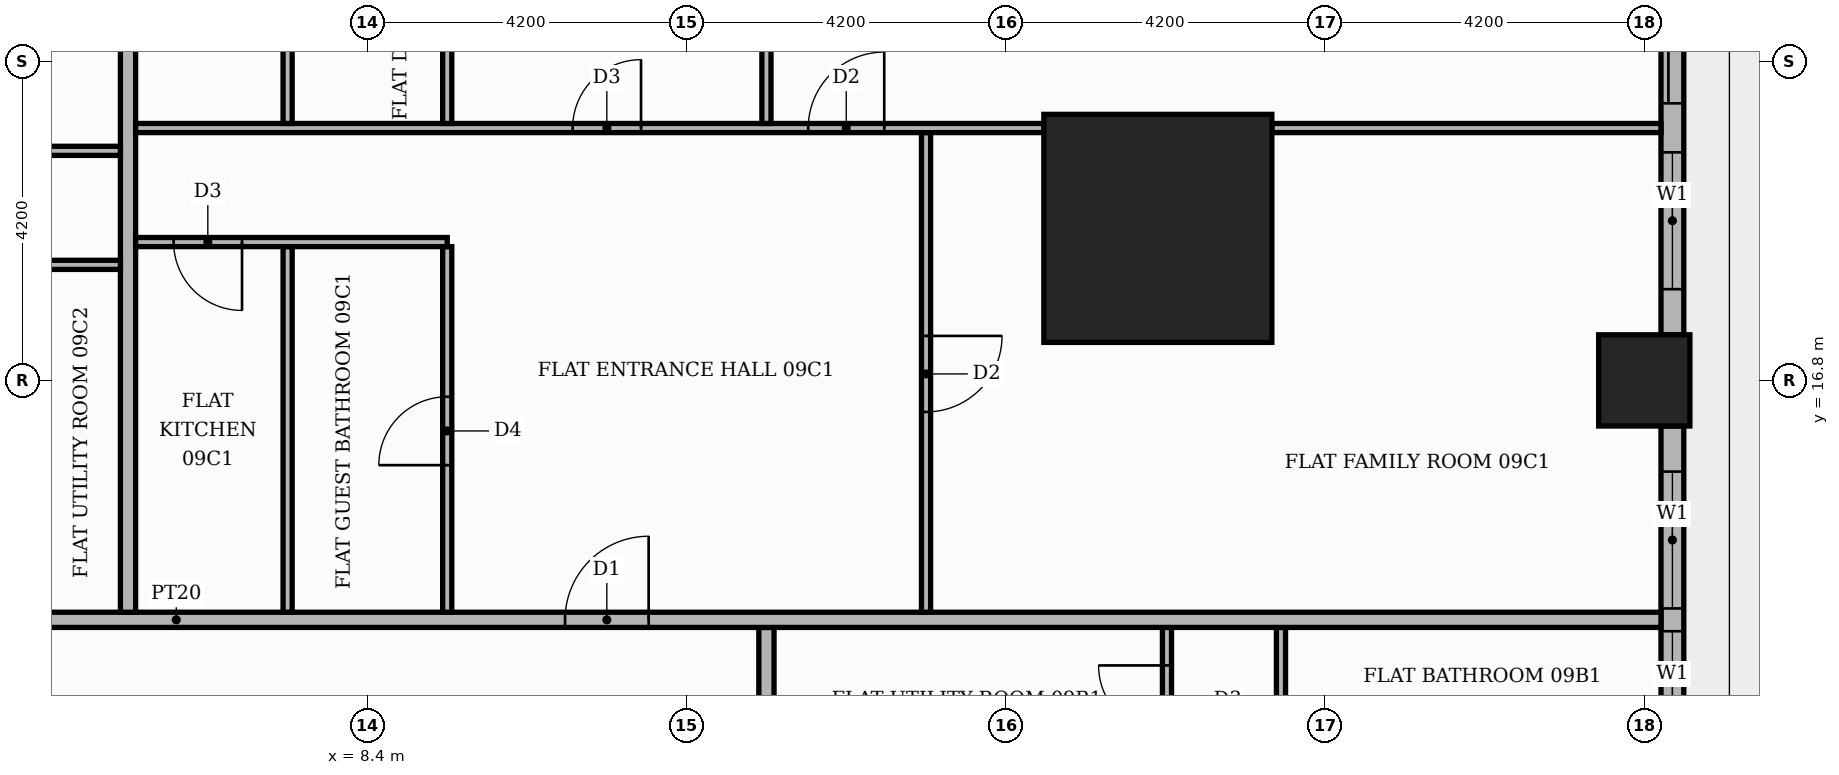
"""IFC4 building model, lengths in metres.
Left out: names, types, materials, properties, quantities, classifications, styles, units other than length and angle.
Written with IfcOpenShell. Run it as: python <this file> out.ifc"""

import sys

from ifc_helpers import new_model, si_unit, direction, frame, frame_2d, origin, origin_2d, place, context, subcontext, project, spatial, rectangle, extrude, element, fill, save


model = new_model("IFC4")
c1 = context("Model", 3, precision=1e-05, world=origin(), true_north=direction((0.0, 1.0)))
c2 = subcontext(c1, "Body", "Model", "MODEL_VIEW")
j1 = project(units=[si_unit("LENGTHUNIT", "METRE"), si_unit("PLANEANGLEUNIT", "RADIAN")], contexts=[c1])
p1 = place(None, origin())
s1 = spatial("IfcSite", under=j1, at=p1, CompositionType="ELEMENT")
p2 = place(p1, origin())
s2 = spatial("IfcBuilding", under=s1, at=p2, CompositionType="ELEMENT")
p3 = place(p2, frame((0.0, 0.0, 42.6)))
s3 = spatial("IfcBuildingStorey", under=s2, at=p3, CompositionType="ELEMENT", Elevation=42.6)
p4 = place(p3, frame((18.8, 18.8, 0.0), z_axis=(0.0, 0.0, 1.0), x_axis=(1.0, 0.0, 0.0)))
e1 = element("IfcColumn", 1, at=p4, inside=s3, PredefinedType="COLUMN", context=c2, shape_type="SweptSolid", body=[
    extrude(rectangle(XDim=3.0, YDim=3.0, at=origin_2d()), origin(), (0.0, 0.0, 1.0), 3.9),
])
p5 = place(p3, frame((25.2, 16.8, 0.0), z_axis=(0.0, 0.0, 1.0), x_axis=(1.0, 0.0, 0.0)))
e2 = element("IfcColumn", 2, at=p5, inside=s3, PredefinedType="COLUMN", context=c2, shape_type="SweptSolid", body=[
    extrude(rectangle(XDim=1.2, YDim=1.2, at=origin_2d()), origin(), (0.0, 0.0, 1.0), 3.9),
])
p6 = place(p3, frame((25.57, 9.0, 0.0), z_axis=(0.0, 0.0, 1.0), x_axis=(0.0, 1.0, 0.0)))
e3 = element("IfcWall", 3, at=p6, inside=s3, PredefinedType="STANDARD", context=c2, shape_type="SweptSolid", body=[
    extrude(rectangle(XDim=7.2, YDim=0.3, at=frame_2d((3.6, 0.0))), origin(), (0.0, 0.0, 1.0), 3.48),
])
p7 = place(p6, frame((0.6, 0.0, 0.9)))
e4 = element("IfcOpeningElement", 4, at=p7, cuts=e3, PredefinedType="OPENING", context=c2, shape_type="SweptSolid", body=[
    extrude(rectangle(XDim=1.8, YDim=2.1, at=frame_2d((0.9, 1.05))), frame((0.0, 0.16, 0.0), z_axis=(0.0, -1.0, 0.0), x_axis=(1.0, 0.0, 0.0)), (0.0, 0.0, 1.0), 0.32),
])
p8 = place(p6, frame((2.7, 0.0, 0.9)))
e5 = element("IfcOpeningElement", 5, at=p8, cuts=e3, PredefinedType="OPENING", context=c2, shape_type="SweptSolid", body=[
    extrude(rectangle(XDim=1.8, YDim=2.1, at=frame_2d((0.9, 1.05))), frame((0.0, 0.16, 0.0), z_axis=(0.0, -1.0, 0.0), x_axis=(1.0, 0.0, 0.0)), (0.0, 0.0, 1.0), 0.32),
])
p9 = place(p6, frame((4.8, 0.0, 0.9)))
e6 = element("IfcOpeningElement", 6, at=p9, cuts=e3, PredefinedType="OPENING", context=c2, shape_type="SweptSolid", body=[
    extrude(rectangle(XDim=1.8, YDim=2.1, at=frame_2d((0.9, 1.05))), frame((0.0, 0.16, 0.0), z_axis=(0.0, -1.0, 0.0), x_axis=(1.0, 0.0, 0.0)), (0.0, 0.0, 1.0), 0.32),
])
p10 = place(p3, frame((25.57, 17.4, 0.0), z_axis=(0.0, 0.0, 1.0), x_axis=(0.0, 1.0, 0.0)))
e7 = element("IfcWall", 7, at=p10, inside=s3, PredefinedType="STANDARD", context=c2, shape_type="SweptSolid", body=[
    extrude(rectangle(XDim=5.32, YDim=0.3, at=frame_2d((2.66, 0.0))), origin(), (0.0, 0.0, 1.0), 3.48),
])
p11 = place(p10, frame((0.6, 0.0, 0.9)))
e8 = element("IfcOpeningElement", 8, at=p11, cuts=e7, PredefinedType="OPENING", context=c2, shape_type="SweptSolid", body=[
    extrude(rectangle(XDim=1.8, YDim=2.1, at=frame_2d((0.9, 1.05))), frame((0.0, 0.16, 0.0), z_axis=(0.0, -1.0, 0.0), x_axis=(1.0, 0.0, 0.0)), (0.0, 0.0, 1.0), 0.32),
])
p12 = place(p10, frame((3.045, 0.0, 0.0)))
e9 = element("IfcOpeningElement", 9, at=p12, cuts=e7, PredefinedType="OPENING", context=c2, shape_type="SweptSolid", body=[
    extrude(rectangle(XDim=1.8, YDim=2.4, at=frame_2d((0.9, 1.2))), frame((0.0, 0.16, 0.0), z_axis=(0.0, -1.0, 0.0), x_axis=(1.0, 0.0, 0.0)), (0.0, 0.0, 1.0), 0.32),
])
p13 = place(p3, frame((13.65, -13.55, 0.0), z_axis=(0.0, 0.0, 1.0), x_axis=(0.0, 1.0, 0.0)))
e10 = element("IfcWall", 10, at=p13, inside=s3, PredefinedType="PARTITIONING", context=c2, shape_type="SweptSolid", body=[
    extrude(rectangle(XDim=27.1, YDim=0.2, at=frame_2d((13.55, 0.0))), origin(), (0.0, 0.0, 1.0), 3.48),
])
p14 = place(p13, frame((2.5, 0.0, 0.0)))
e11 = element("IfcOpeningElement", 11, at=p14, cuts=e10, PredefinedType="OPENING", context=c2, shape_type="SweptSolid", body=[
    extrude(rectangle(XDim=1.1, YDim=2.4, at=frame_2d((0.55, 1.2))), frame((0.0, 0.11, 0.0), z_axis=(0.0, -1.0, 0.0), x_axis=(1.0, 0.0, 0.0)), (0.0, 0.0, 1.0), 0.22),
])
p15 = place(p3, frame((18.92, 11.61, 0.0), z_axis=(0.0, 0.0, 1.0), x_axis=(0.0, 1.0, 0.0)))
e12 = element("IfcWall", 12, at=p15, inside=s3, PredefinedType="PARTITIONING", context=c2, shape_type="SweptSolid", body=[
    extrude(rectangle(XDim=1.94, YDim=0.12, at=frame_2d((0.97, 0.0))), origin(), (0.0, 0.0, 1.0), 3.48),
])
p16 = place(p15, frame((0.54, 0.0, 0.0)))
e13 = element("IfcOpeningElement", 13, at=p16, cuts=e12, PredefinedType="OPENING", context=c2, shape_type="SweptSolid", body=[
    extrude(rectangle(XDim=0.9, YDim=2.1, at=frame_2d((0.45, 1.05))), frame((0.0, 0.07, 0.0), z_axis=(0.0, -1.0, 0.0), x_axis=(1.0, 0.0, 0.0)), (0.0, 0.0, 1.0), 0.14),
])
p17 = place(p3, frame((20.42, 11.61, 0.0), z_axis=(0.0, 0.0, 1.0), x_axis=(0.0, 1.0, 0.0)))
e14 = element("IfcWall", 14, at=p17, inside=s3, PredefinedType="PARTITIONING", context=c2, shape_type="SweptSolid", body=[
    extrude(rectangle(XDim=1.94, YDim=0.12, at=frame_2d((0.97, 0.0))), origin(), (0.0, 0.0, 1.0), 3.48),
])
p18 = place(p3, frame((-13.65, 13.65, 0.0), z_axis=(0.0, 0.0, 1.0), x_axis=(1.0, 0.0, 0.0)))
e15 = element("IfcWall", 15, at=p18, inside=s3, PredefinedType="PARTITIONING", context=c2, shape_type="SweptSolid", body=[
    extrude(rectangle(XDim=39.07, YDim=0.2, at=frame_2d((19.535, 0.0))), origin(), (0.0, 0.0, 1.0), 3.48),
])
p19 = place(p18, frame((24.65, 0.0, 0.0)))
e16 = element("IfcOpeningElement", 16, at=p19, cuts=e15, PredefinedType="OPENING", context=c2, shape_type="SweptSolid", body=[
    extrude(rectangle(XDim=1.1, YDim=2.4, at=frame_2d((0.55, 1.2))), frame((0.0, 0.11, 0.0), z_axis=(0.0, -1.0, 0.0), x_axis=(1.0, 0.0, 0.0)), (0.0, 0.0, 1.0), 0.22),
])
p20 = place(p18, frame((14.15, 0.0, 0.0)))
e17 = element("IfcOpeningElement", 17, at=p20, cuts=e15, PredefinedType="OPENING", context=c2, shape_type="SweptSolid", body=[
    extrude(rectangle(XDim=1.1, YDim=2.4, at=frame_2d((0.55, 1.2))), frame((0.0, 0.11, 0.0), z_axis=(0.0, -1.0, 0.0), x_axis=(1.0, 0.0, 0.0)), (0.0, 0.0, 1.0), 0.22),
])
p21 = place(p3, frame((5.25, 13.75, 0.0), z_axis=(0.0, 0.0, 1.0), x_axis=(0.0, 1.0, 0.0)))
e18 = element("IfcWall", 18, at=p21, inside=s3, PredefinedType="PARTITIONING", context=c2, shape_type="SweptSolid", body=[
    extrude(rectangle(XDim=11.67, YDim=0.2, at=frame_2d((5.835, 0.0))), origin(), (0.0, 0.0, 1.0), 3.48),
])
p22 = place(p3, frame((7.35, 13.75, 0.0), z_axis=(0.0, 0.0, 1.0), x_axis=(0.0, 1.0, 0.0)))
e19 = element("IfcWall", 19, at=p22, inside=s3, PredefinedType="PARTITIONING", context=c2, shape_type="SweptSolid", body=[
    extrude(rectangle(XDim=4.81, YDim=0.12, at=frame_2d((2.405, 0.0))), origin(), (0.0, 0.0, 1.0), 3.48),
])
p23 = place(p3, frame((9.45, 13.75, 0.0), z_axis=(0.0, 0.0, 1.0), x_axis=(0.0, 1.0, 0.0)))
e20 = element("IfcWall", 20, at=p23, inside=s3, PredefinedType="PARTITIONING", context=c2, shape_type="SweptSolid", body=[
    extrude(rectangle(XDim=4.81, YDim=0.12, at=frame_2d((2.405, 0.0))), origin(), (0.0, 0.0, 1.0), 3.48),
])
p24 = place(p23, frame((1.935, 0.0, 0.0)))
e21 = element("IfcOpeningElement", 21, at=p24, cuts=e20, PredefinedType="OPENING", context=c2, shape_type="SweptSolid", body=[
    extrude(rectangle(XDim=0.9, YDim=2.1, at=frame_2d((0.45, 1.05))), frame((0.0, 0.07, 0.0), z_axis=(0.0, -1.0, 0.0), x_axis=(1.0, 0.0, 0.0)), (0.0, 0.0, 1.0), 0.14),
])
p25 = place(p3, frame((15.75, 13.75, 0.0), z_axis=(0.0, 0.0, 1.0), x_axis=(0.0, 1.0, 0.0)))
e22 = element("IfcWall", 22, at=p25, inside=s3, PredefinedType="PARTITIONING", context=c2, shape_type="SweptSolid", body=[
    extrude(rectangle(XDim=6.31, YDim=0.12, at=frame_2d((3.155, 0.0))), origin(), (0.0, 0.0, 1.0), 3.48),
])
p26 = place(p25, frame((2.635, 0.0, 0.0)))
e23 = element("IfcOpeningElement", 23, at=p26, cuts=e22, PredefinedType="OPENING", context=c2, shape_type="SweptSolid", body=[
    extrude(rectangle(XDim=1.0, YDim=2.1, at=frame_2d((0.5, 1.05))), frame((0.0, 0.07, 0.0), z_axis=(0.0, -1.0, 0.0), x_axis=(1.0, 0.0, 0.0)), (0.0, 0.0, 1.0), 0.14),
])
p27 = place(p3, frame((3.15, 18.32, 0.0), z_axis=(0.0, 0.0, 1.0), x_axis=(1.0, 0.0, 0.0)))
e24 = element("IfcWall", 24, at=p27, inside=s3, PredefinedType="PARTITIONING", context=c2, shape_type="SweptSolid", body=[
    extrude(rectangle(XDim=2.0, YDim=0.12, at=frame_2d((1.0, 0.0))), origin(), (0.0, 0.0, 1.0), 3.48),
])
p28 = place(p3, frame((5.35, 18.62, 0.0), z_axis=(0.0, 0.0, 1.0), x_axis=(1.0, 0.0, 0.0)))
e25 = element("IfcWall", 25, at=p28, inside=s3, PredefinedType="PARTITIONING", context=c2, shape_type="SweptSolid", body=[
    extrude(rectangle(XDim=4.1, YDim=0.12, at=frame_2d((2.05, 0.0))), origin(), (0.0, 0.0, 1.0), 3.48),
])
p29 = place(p28, frame((0.5, 0.0, 0.0)))
e26 = element("IfcOpeningElement", 26, at=p29, cuts=e25, PredefinedType="OPENING", context=c2, shape_type="SweptSolid", body=[
    extrude(rectangle(XDim=0.9, YDim=2.1, at=frame_2d((0.45, 1.05))), frame((0.0, 0.07, 0.0), z_axis=(0.0, -1.0, 0.0), x_axis=(1.0, 0.0, 0.0)), (0.0, 0.0, 1.0), 0.14),
])
p30 = place(p3, frame((-13.55, 19.82, 0.0), z_axis=(0.0, 0.0, 1.0), x_axis=(1.0, 0.0, 0.0)))
e27 = element("IfcWall", 27, at=p30, inside=s3, PredefinedType="PARTITIONING", context=c2, shape_type="SweptSolid", body=[
    extrude(rectangle(XDim=18.7, YDim=0.12, at=frame_2d((9.35, 0.0))), origin(), (0.0, 0.0, 1.0), 3.48),
])
p31 = place(p30, frame((16.2, 0.0, 0.0)))
e28 = element("IfcOpeningElement", 28, at=p31, cuts=e27, PredefinedType="OPENING", context=c2, shape_type="SweptSolid", body=[
    extrude(rectangle(XDim=1.0, YDim=2.1, at=frame_2d((0.5, 1.05))), frame((0.0, 0.07, 0.0), z_axis=(0.0, -1.0, 0.0), x_axis=(1.0, 0.0, 0.0)), (0.0, 0.0, 1.0), 0.14),
])
p32 = place(p30, frame((12.05, 0.0, 0.0)))
e29 = element("IfcOpeningElement", 29, at=p32, cuts=e27, PredefinedType="OPENING", context=c2, shape_type="SweptSolid", body=[
    extrude(rectangle(XDim=0.9, YDim=2.1, at=frame_2d((0.45, 1.05))), frame((0.0, 0.07, 0.0), z_axis=(0.0, -1.0, 0.0), x_axis=(1.0, 0.0, 0.0)), (0.0, 0.0, 1.0), 0.14),
])
p33 = place(p30, frame((3.65, 0.0, 0.0)))
e30 = element("IfcOpeningElement", 30, at=p33, cuts=e27, PredefinedType="OPENING", context=c2, shape_type="SweptSolid", body=[
    extrude(rectangle(XDim=0.9, YDim=2.1, at=frame_2d((0.45, 1.05))), frame((0.0, 0.07, 0.0), z_axis=(0.0, -1.0, 0.0), x_axis=(1.0, 0.0, 0.0)), (0.0, 0.0, 1.0), 0.14),
])
p34 = place(p3, frame((5.35, 20.12, 0.0), z_axis=(0.0, 0.0, 1.0), x_axis=(1.0, 0.0, 0.0)))
e31 = element("IfcWall", 31, at=p34, inside=s3, PredefinedType="PARTITIONING", context=c2, shape_type="SweptSolid", body=[
    extrude(rectangle(XDim=11.95, YDim=0.12, at=frame_2d((5.975, 0.0))), origin(), (0.0, 0.0, 1.0), 3.48),
])
p35 = place(p34, frame((8.85, 0.0, 0.0)))
e32 = element("IfcOpeningElement", 32, at=p35, cuts=e31, PredefinedType="OPENING", context=c2, shape_type="SweptSolid", body=[
    extrude(rectangle(XDim=1.0, YDim=2.1, at=frame_2d((0.5, 1.05))), frame((0.0, 0.07, 0.0), z_axis=(0.0, -1.0, 0.0), x_axis=(1.0, 0.0, 0.0)), (0.0, 0.0, 1.0), 0.14),
])
p36 = place(p34, frame((5.75, 0.0, 0.0)))
e33 = element("IfcOpeningElement", 33, at=p36, cuts=e31, PredefinedType="OPENING", context=c2, shape_type="SweptSolid", body=[
    extrude(rectangle(XDim=0.9, YDim=2.1, at=frame_2d((0.45, 1.05))), frame((0.0, 0.07, 0.0), z_axis=(0.0, -1.0, 0.0), x_axis=(1.0, 0.0, 0.0)), (0.0, 0.0, 1.0), 0.14),
])
p37 = place(p3, frame((20.3, 20.12, 0.0), z_axis=(0.0, 0.0, 1.0), x_axis=(1.0, 0.0, 0.0)))
e34 = element("IfcWall", 34, at=p37, inside=s3, PredefinedType="PARTITIONING", context=c2, shape_type="SweptSolid", body=[
    extrude(rectangle(XDim=5.12, YDim=0.12, at=frame_2d((2.56, 0.0))), origin(), (0.0, 0.0, 1.0), 3.48),
])
p38 = place(p3, frame((7.35, 20.18, 0.0), z_axis=(0.0, 0.0, 1.0), x_axis=(0.0, 1.0, 0.0)))
e35 = element("IfcWall", 35, at=p38, inside=s3, PredefinedType="PARTITIONING", context=c2, shape_type="SweptSolid", body=[
    extrude(rectangle(XDim=5.24, YDim=0.12, at=frame_2d((2.62, 0.0))), origin(), (0.0, 0.0, 1.0), 3.48),
])
p39 = place(p38, frame((2.29, 0.0, 0.0)))
e36 = element("IfcOpeningElement", 36, at=p39, cuts=e35, PredefinedType="OPENING", context=c2, shape_type="SweptSolid", body=[
    extrude(rectangle(XDim=0.9, YDim=2.1, at=frame_2d((0.45, 1.05))), frame((0.0, 0.07, 0.0), z_axis=(0.0, -1.0, 0.0), x_axis=(1.0, 0.0, 0.0)), (0.0, 0.0, 1.0), 0.14),
])
p40 = place(p3, frame((9.45, 20.18, 0.0), z_axis=(0.0, 0.0, 1.0), x_axis=(0.0, 1.0, 0.0)))
e37 = element("IfcWall", 37, at=p40, inside=s3, PredefinedType="PARTITIONING", context=c2, shape_type="SweptSolid", body=[
    extrude(rectangle(XDim=5.24, YDim=0.12, at=frame_2d((2.62, 0.0))), origin(), (0.0, 0.0, 1.0), 3.48),
])
p41 = place(p40, frame((2.29, 0.0, 0.0)))
e38 = element("IfcOpeningElement", 38, at=p41, cuts=e37, PredefinedType="OPENING", context=c2, shape_type="SweptSolid", body=[
    extrude(rectangle(XDim=0.9, YDim=2.1, at=frame_2d((0.45, 1.05))), frame((0.0, 0.07, 0.0), z_axis=(0.0, -1.0, 0.0), x_axis=(1.0, 0.0, 0.0)), (0.0, 0.0, 1.0), 0.14),
])
p42 = place(p3, frame((13.65, 20.18, 0.0), z_axis=(0.0, 0.0, 1.0), x_axis=(0.0, 1.0, 0.0)))
e39 = element("IfcWall", 39, at=p42, inside=s3, PredefinedType="PARTITIONING", context=c2, shape_type="SweptSolid", body=[
    extrude(rectangle(XDim=5.24, YDim=0.12, at=frame_2d((2.62, 0.0))), origin(), (0.0, 0.0, 1.0), 3.48),
])
p43 = place(p8, origin())
e40 = element("IfcWindow", 40, at=p43, inside=s3, PartitioningType="SINGLE_PANEL", PredefinedType="WINDOW", context=c2, shape_type="SweptSolid", body=[
    extrude(rectangle(XDim=1.8, YDim=2.1, at=frame_2d((0.9, 1.05))), frame((0.0, 0.03, 0.0), z_axis=(0.0, -1.0, 0.0), x_axis=(1.0, 0.0, 0.0)), (0.0, 0.0, 1.0), 0.06),
])
fill(e5, e40)
p44 = place(p9, origin())
e41 = element("IfcWindow", 41, at=p44, inside=s3, PartitioningType="SINGLE_PANEL", PredefinedType="WINDOW", context=c2, shape_type="SweptSolid", body=[
    extrude(rectangle(XDim=1.8, YDim=2.1, at=frame_2d((0.9, 1.05))), frame((0.0, 0.03, 0.0), z_axis=(0.0, -1.0, 0.0), x_axis=(1.0, 0.0, 0.0)), (0.0, 0.0, 1.0), 0.06),
])
fill(e6, e41)
p45 = place(p11, origin())
e42 = element("IfcWindow", 42, at=p45, inside=s3, PartitioningType="SINGLE_PANEL", PredefinedType="WINDOW", context=c2, shape_type="SweptSolid", body=[
    extrude(rectangle(XDim=1.8, YDim=2.1, at=frame_2d((0.9, 1.05))), frame((0.0, 0.03, 0.0), z_axis=(0.0, -1.0, 0.0), x_axis=(1.0, 0.0, 0.0)), (0.0, 0.0, 1.0), 0.06),
])
fill(e8, e42)
p46 = place(p12, origin())
e43 = element("IfcDoor", 43, at=p46, inside=s3, OperationType="SLIDING_TO_RIGHT", PredefinedType="DOOR", context=c2, shape_type="SweptSolid", body=[
    extrude(rectangle(XDim=1.8, YDim=2.4, at=frame_2d((0.9, 1.2))), frame((0.0, 0.025, 0.0), z_axis=(0.0, -1.0, 0.0), x_axis=(1.0, 0.0, 0.0)), (0.0, 0.0, 1.0), 0.05),
])
fill(e9, e43)
p47 = place(p16, origin())
e44 = element("IfcDoor", 44, at=p47, inside=s3, OperationType="SINGLE_SWING_RIGHT", PredefinedType="DOOR", context=c2, shape_type="SweptSolid", body=[
    extrude(rectangle(XDim=0.9, YDim=2.1, at=frame_2d((0.45, 1.05))), frame((0.0, 0.025, 0.0), z_axis=(0.0, -1.0, 0.0), x_axis=(1.0, 0.0, 0.0)), (0.0, 0.0, 1.0), 0.05),
])
fill(e13, e44)
p48 = place(p19, origin())
e45 = element("IfcDoor", 45, at=p48, inside=s3, OperationType="SINGLE_SWING_RIGHT", PredefinedType="DOOR", context=c2, shape_type="SweptSolid", body=[
    extrude(rectangle(XDim=1.1, YDim=2.4, at=frame_2d((0.55, 1.2))), frame((0.0, 0.025, 0.0), z_axis=(0.0, -1.0, 0.0), x_axis=(1.0, 0.0, 0.0)), (0.0, 0.0, 1.0), 0.05),
])
fill(e16, e45)
p49 = place(p26, frame((1.0, 0.0, 0.0), z_axis=(0.0, 0.0, 1.0), x_axis=(-1.0, 0.0, 0.0)))
e46 = element("IfcDoor", 46, at=p49, inside=s3, OperationType="SINGLE_SWING_RIGHT", PredefinedType="DOOR", context=c2, shape_type="SweptSolid", body=[
    extrude(rectangle(XDim=1.0, YDim=2.1, at=frame_2d((0.5, 1.05))), frame((0.0, 0.025, 0.0), z_axis=(0.0, -1.0, 0.0), x_axis=(1.0, 0.0, 0.0)), (0.0, 0.0, 1.0), 0.05),
])
fill(e23, e46)
p50 = place(p24, origin())
e47 = element("IfcDoor", 47, at=p50, inside=s3, OperationType="SINGLE_SWING_LEFT", PredefinedType="DOOR", context=c2, shape_type="SweptSolid", body=[
    extrude(rectangle(XDim=0.9, YDim=2.1, at=frame_2d((0.45, 1.05))), frame((0.0, 0.025, 0.0), z_axis=(0.0, -1.0, 0.0), x_axis=(1.0, 0.0, 0.0)), (0.0, 0.0, 1.0), 0.05),
])
fill(e21, e47)
p51 = place(p29, frame((0.9, 0.0, 0.0), z_axis=(0.0, 0.0, 1.0), x_axis=(-1.0, 0.0, 0.0)))
e48 = element("IfcDoor", 48, at=p51, inside=s3, OperationType="SINGLE_SWING_RIGHT", PredefinedType="DOOR", context=c2, shape_type="SweptSolid", body=[
    extrude(rectangle(XDim=0.9, YDim=2.1, at=frame_2d((0.45, 1.05))), frame((0.0, 0.025, 0.0), z_axis=(0.0, -1.0, 0.0), x_axis=(1.0, 0.0, 0.0)), (0.0, 0.0, 1.0), 0.05),
])
fill(e26, e48)
p52 = place(p35, origin())
e49 = element("IfcDoor", 49, at=p52, inside=s3, OperationType="SINGLE_SWING_RIGHT", PredefinedType="DOOR", context=c2, shape_type="SweptSolid", body=[
    extrude(rectangle(XDim=1.0, YDim=2.1, at=frame_2d((0.5, 1.05))), frame((0.0, 0.025, 0.0), z_axis=(0.0, -1.0, 0.0), x_axis=(1.0, 0.0, 0.0)), (0.0, 0.0, 1.0), 0.05),
])
fill(e32, e49)
p53 = place(p36, origin())
e50 = element("IfcDoor", 50, at=p53, inside=s3, OperationType="SINGLE_SWING_RIGHT", PredefinedType="DOOR", context=c2, shape_type="SweptSolid", body=[
    extrude(rectangle(XDim=0.9, YDim=2.1, at=frame_2d((0.45, 1.05))), frame((0.0, 0.025, 0.0), z_axis=(0.0, -1.0, 0.0), x_axis=(1.0, 0.0, 0.0)), (0.0, 0.0, 1.0), 0.05),
])
fill(e33, e50)
save(model, sys.argv[1])
